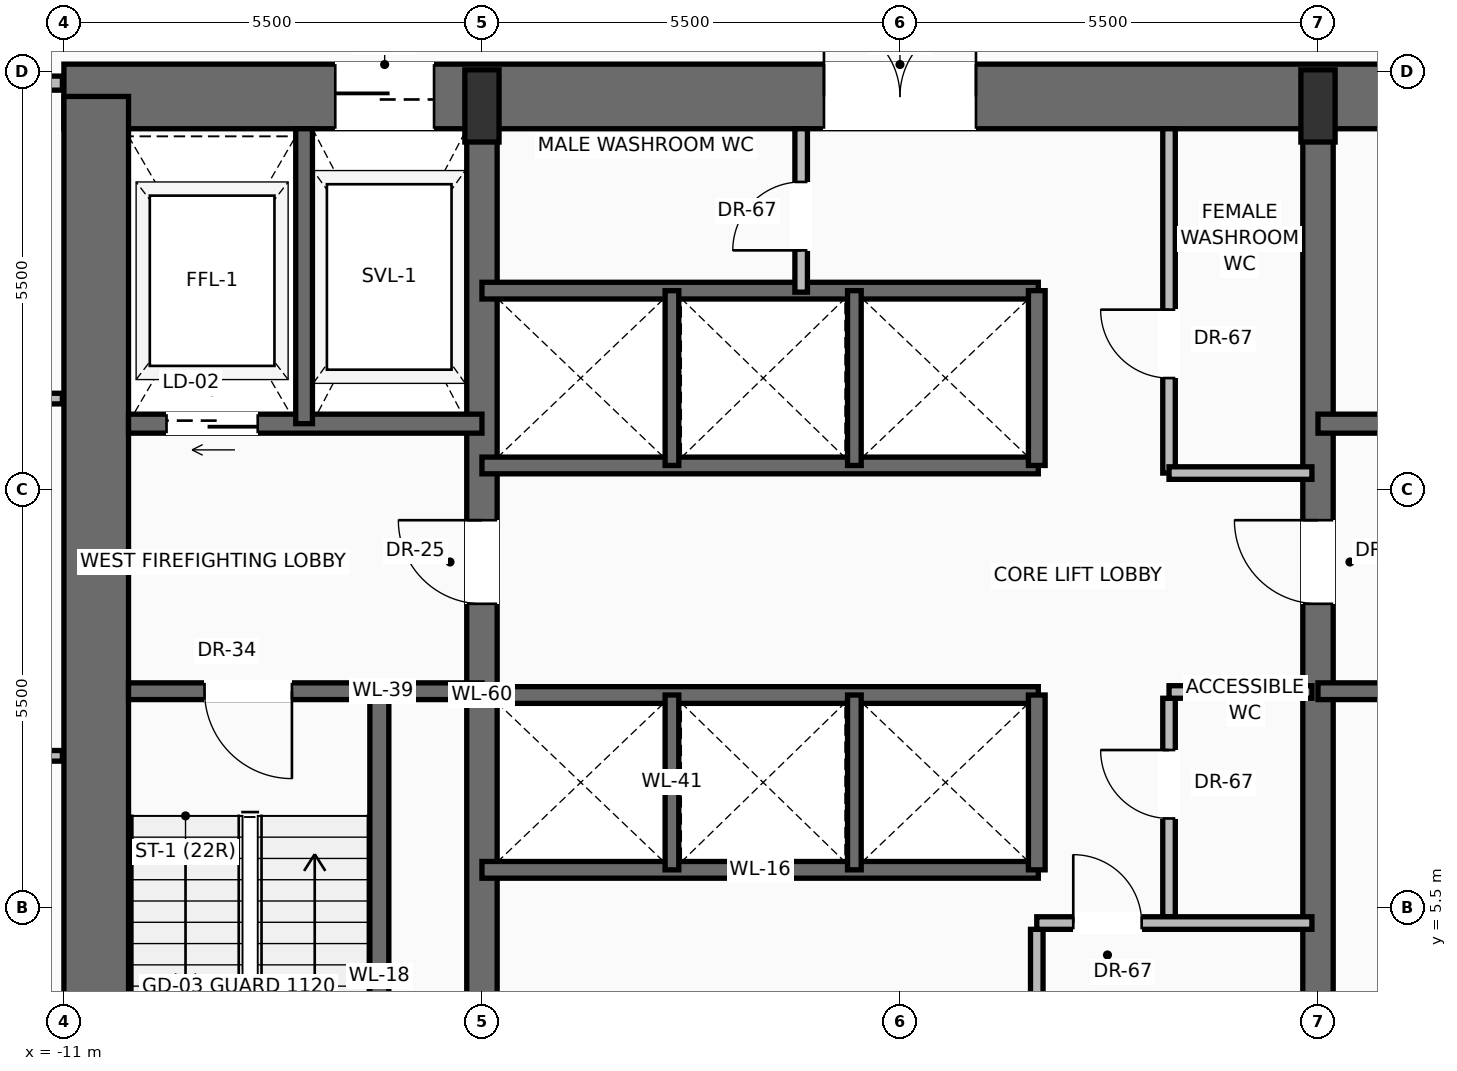
"""IFC4 building model, lengths in metres.
Left out: names, types, materials, properties, quantities, classifications, styles, units other than length and angle.
Written with IfcOpenShell. Run it as: python <this file> out.ifc"""

import sys

from ifc_helpers import new_model, si_unit, direction, frame, frame_2d, origin, origin_2d, place, context, subcontext, project, spatial, rectangle, extrude, source, transform, mapped, element, fill, save


model = new_model("IFC4")
c1 = context("Model", 3, precision=1e-05, world=origin(), true_north=direction((0.0, 1.0)))
c2 = subcontext(c1, "Body", "Model", "MODEL_VIEW")
j1 = project(units=[si_unit("LENGTHUNIT", "METRE"), si_unit("PLANEANGLEUNIT", "RADIAN")], contexts=[c1])
p1 = place(None, origin())
s1 = spatial("IfcSite", under=j1, at=p1, CompositionType="ELEMENT")
p2 = place(p1, origin())
s2 = spatial("IfcBuilding", under=s1, at=p2, CompositionType="ELEMENT")
p3 = place(p2, frame((0.0, 0.0, 38.6)))
s3 = spatial("IfcBuildingStorey", under=s2, at=p3, CompositionType="ELEMENT", Elevation=38.6)
p4 = place(p3, frame((-11.0, 16.175, 0.0), z_axis=(0.0, 0.0, 1.0), x_axis=(1.0, 0.0, 0.0)))
e1 = element("IfcWall", 1, at=p4, inside=s3, PredefinedType="SHEAR", context=c2, shape_type="SweptSolid", body=[
    extrude(rectangle(XDim=22.0, YDim=0.85, at=frame_2d((11.0, 0.0))), origin(), (0.0, 0.0, 1.0), 3.45),
])
p5 = place(p4, frame((3.57, 0.0, 0.0)))
e2 = element("IfcOpeningElement", 2, at=p5, cuts=e1, PredefinedType="OPENING", context=c2, shape_type="SweptSolid", body=[
    extrude(rectangle(XDim=1.3, YDim=2.3, at=frame_2d((0.65, 1.15))), frame((0.0, 0.435, 0.0), z_axis=(0.0, -1.0, 0.0), x_axis=(1.0, 0.0, 0.0)), (0.0, 0.0, 1.0), 0.87),
])
p6 = place(p4, frame((10.0, 0.0, 0.0)))
e3 = element("IfcOpeningElement", 3, at=p6, cuts=e1, PredefinedType="OPENING", context=c2, shape_type="SweptSolid", body=[
    extrude(rectangle(XDim=2.0, YDim=2.4, at=frame_2d((1.0, 1.2))), frame((0.0, 0.435, 0.0), z_axis=(0.0, -1.0, 0.0), x_axis=(1.0, 0.0, 0.0)), (0.0, 0.0, 1.0), 0.87),
])
p7 = place(p3, frame((-10.575, 0.425, 0.0), z_axis=(0.0, 0.0, 1.0), x_axis=(0.0, 1.0, 0.0)))
e4 = element("IfcWall", 4, at=p7, inside=s3, PredefinedType="SHEAR", context=c2, shape_type="SweptSolid", body=[
    extrude(rectangle(XDim=15.75, YDim=0.85, at=frame_2d((7.875, 0.0))), origin(), (0.0, 0.0, 1.0), 3.45),
])
p8 = place(p3, frame((-5.5, 0.425, 0.0), z_axis=(0.0, 0.0, 1.0), x_axis=(0.0, 1.0, 0.0)))
e5 = element("IfcWall", 5, at=p8, inside=s3, PredefinedType="SHEAR", context=c2, shape_type="SweptSolid", body=[
    extrude(rectangle(XDim=15.75, YDim=0.4, at=frame_2d((7.875, 0.0))), origin(), (0.0, 0.0, 1.0), 3.45),
])
p9 = place(p8, frame((9.075, 0.0, 0.0)))
e6 = element("IfcOpeningElement", 6, at=p9, cuts=e5, PredefinedType="OPENING", context=c2, shape_type="SweptSolid", body=[
    extrude(rectangle(XDim=1.1, YDim=2.2, at=frame_2d((0.55, 1.1))), frame((0.0, 0.21, 0.0), z_axis=(0.0, -1.0, 0.0), x_axis=(1.0, 0.0, 0.0)), (0.0, 0.0, 1.0), 0.42),
])
p10 = place(p3, frame((5.5, 0.425, 0.0), z_axis=(0.0, 0.0, 1.0), x_axis=(0.0, 1.0, 0.0)))
e7 = element("IfcWall", 7, at=p10, inside=s3, PredefinedType="SHEAR", context=c2, shape_type="SweptSolid", body=[
    extrude(rectangle(XDim=15.75, YDim=0.4, at=frame_2d((7.875, 0.0))), origin(), (0.0, 0.0, 1.0), 3.45),
])
p11 = place(p10, frame((9.075, 0.0, 0.0)))
e8 = element("IfcOpeningElement", 8, at=p11, cuts=e7, PredefinedType="OPENING", context=c2, shape_type="SweptSolid", body=[
    extrude(rectangle(XDim=1.1, YDim=2.2, at=frame_2d((0.55, 1.1))), frame((0.0, 0.21, 0.0), z_axis=(0.0, -1.0, 0.0), x_axis=(1.0, 0.0, 0.0)), (0.0, 0.0, 1.0), 0.42),
])
m1 = source(origin(), c2, "Body", "SweptSolid", [
    extrude(rectangle(XDim=0.45, YDim=0.95, at=origin_2d()), origin(), (0.0, 0.0, 1.0), 3.7),
])
for number, where, z_axis, x_axis in (
    (9, (-5.5, 16.05, 0.0), (0.0, 0.0, 1.0), (1.0, 0.0, 0.0)),
    (10, (5.5, 16.05, 0.0), (0.0, 0.0, 1.0), (1.0, 0.0, 0.0)),
):
    element("IfcColumn", number, at=place(p3, frame(where, z_axis=z_axis, x_axis=x_axis)), inside=s3, PredefinedType="PILASTER", context=c2, shape_type="MappedRepresentation", body=[
        mapped(m1, transform((0.0, 0.0, 0.0), scale=1.0)),
    ])
p12 = place(p3, frame((-6.85, 0.85, 0.0), z_axis=(0.0, 0.0, 1.0), x_axis=(0.0, 1.0, 0.0)))
e11 = element("IfcWall", 11, at=p12, inside=s3, PredefinedType="SOLIDWALL", context=c2, shape_type="SweptSolid", body=[
    extrude(rectangle(XDim=7.5, YDim=0.25, at=frame_2d((3.75, 0.0))), origin(), (0.0, 0.0, 1.0), 3.45),
])
p13 = place(p3, frame((-5.5, 8.35, 0.0), z_axis=(0.0, 0.0, 1.0), x_axis=(-1.0, 0.0, 0.0)))
e12 = element("IfcWall", 12, at=p13, inside=s3, PredefinedType="SOLIDWALL", context=c2, shape_type="SweptSolid", body=[
    extrude(rectangle(XDim=4.65, YDim=0.22, at=frame_2d((2.325, 0.0))), origin(), (0.0, 0.0, 1.0), 3.45),
])
p14 = place(p13, frame((2.5, 0.0, 0.0)))
e13 = element("IfcOpeningElement", 13, at=p14, cuts=e12, PredefinedType="OPENING", context=c2, shape_type="SweptSolid", body=[
    extrude(rectangle(XDim=1.15, YDim=2.2, at=frame_2d((0.575, 1.1))), frame((0.0, 0.12, 0.0), z_axis=(0.0, -1.0, 0.0), x_axis=(1.0, 0.0, 0.0)), (0.0, 0.0, 1.0), 0.24),
])
p15 = place(p3, frame((-5.5, 11.87, 0.0), z_axis=(0.0, 0.0, 1.0), x_axis=(-1.0, 0.0, 0.0)))
e14 = element("IfcWall", 14, at=p15, inside=s3, PredefinedType="SOLIDWALL", context=c2, shape_type="SweptSolid", body=[
    extrude(rectangle(XDim=4.65, YDim=0.25, at=frame_2d((2.325, 0.0))), origin(), (0.0, 0.0, 1.0), 3.45),
])
p16 = place(p15, frame((2.95, 0.0, 0.0)))
e15 = element("IfcOpeningElement", 15, at=p16, cuts=e14, PredefinedType="OPENING", context=c2, shape_type="SweptSolid", body=[
    extrude(rectangle(XDim=1.2, YDim=2.25, at=frame_2d((0.6, 1.125))), frame((0.0, 0.135, 0.0), z_axis=(0.0, -1.0, 0.0), x_axis=(1.0, 0.0, 0.0)), (0.0, 0.0, 1.0), 0.27),
])
p17 = place(p3, frame((-7.84, 11.87, 0.0), z_axis=(0.0, 0.0, 1.0), x_axis=(0.0, 1.0, 0.0)))
e16 = element("IfcWall", 16, at=p17, inside=s3, PredefinedType="SOLIDWALL", context=c2, shape_type="SweptSolid", body=[
    extrude(rectangle(XDim=3.88, YDim=0.22, at=frame_2d((1.94, 0.0))), origin(), (0.0, 0.0, 1.0), 3.45),
])
p18 = place(p3, frame((10.15, 8.35, 0.0), z_axis=(0.0, 0.0, 1.0), x_axis=(-1.0, 0.0, 0.0)))
e17 = element("IfcWall", 17, at=p18, inside=s3, PredefinedType="SOLIDWALL", context=c2, shape_type="SweptSolid", body=[
    extrude(rectangle(XDim=4.65, YDim=0.22, at=frame_2d((2.325, 0.0))), origin(), (0.0, 0.0, 1.0), 3.45),
])
p19 = place(p18, frame((1.0, 0.0, 0.0)))
e18 = element("IfcOpeningElement", 18, at=p19, cuts=e17, PredefinedType="OPENING", context=c2, shape_type="SweptSolid", body=[
    extrude(rectangle(XDim=1.15, YDim=2.2, at=frame_2d((0.575, 1.1))), frame((0.0, 0.12, 0.0), z_axis=(0.0, -1.0, 0.0), x_axis=(1.0, 0.0, 0.0)), (0.0, 0.0, 1.0), 0.24),
])
p20 = place(p3, frame((10.15, 11.87, 0.0), z_axis=(0.0, 0.0, 1.0), x_axis=(-1.0, 0.0, 0.0)))
e19 = element("IfcWall", 19, at=p20, inside=s3, PredefinedType="SOLIDWALL", context=c2, shape_type="SweptSolid", body=[
    extrude(rectangle(XDim=4.65, YDim=0.25, at=frame_2d((2.325, 0.0))), origin(), (0.0, 0.0, 1.0), 3.45),
])
p21 = place(p20, frame((0.5, 0.0, 0.0)))
e20 = element("IfcOpeningElement", 20, at=p21, cuts=e19, PredefinedType="OPENING", context=c2, shape_type="SweptSolid", body=[
    extrude(rectangle(XDim=1.2, YDim=2.25, at=frame_2d((0.6, 1.125))), frame((0.0, 0.135, 0.0), z_axis=(0.0, -1.0, 0.0), x_axis=(1.0, 0.0, 0.0)), (0.0, 0.0, 1.0), 0.27),
])
p22 = place(p3, frame((1.8, 3.16, 0.0), z_axis=(0.0, 0.0, 1.0), x_axis=(0.0, 1.0, 0.0)))
e21 = element("IfcWall", 21, at=p22, inside=s3, PredefinedType="PARTITIONING", context=c2, shape_type="SweptSolid", body=[
    extrude(rectangle(XDim=2.058, YDim=0.165, at=frame_2d((1.029, 0.0))), origin(), (0.0, 0.0, 1.0), 3.442),
])
p23 = place(p3, frame((3.54, 5.383, 0.0), z_axis=(0.0, 0.0, 1.0), x_axis=(0.0, 1.0, 0.0)))
e22 = element("IfcWall", 22, at=p23, inside=s3, PredefinedType="PARTITIONING", context=c2, shape_type="SweptSolid", body=[
    extrude(rectangle(XDim=2.875, YDim=0.165, at=frame_2d((1.438, 0.0))), origin(), (0.0, 0.0, 1.0), 3.442),
])
p24 = place(p23, frame((1.294, 0.0, 0.0)))
e23 = element("IfcOpeningElement", 23, at=p24, cuts=e22, PredefinedType="OPENING", context=c2, shape_type="SweptSolid", body=[
    extrude(rectangle(XDim=0.9, YDim=2.1, at=frame_2d((0.45, 1.05))), frame((0.0, 0.093, 0.0), z_axis=(0.0, -1.0, 0.0), x_axis=(1.0, 0.0, 0.0)), (0.0, 0.0, 1.0), 0.185),
])
p25 = place(p3, frame((3.54, 8.34, 0.0), z_axis=(0.0, 0.0, 1.0), x_axis=(1.0, 0.0, 0.0)))
e24 = element("IfcWall", 24, at=p25, inside=s3, PredefinedType="PARTITIONING", context=c2, shape_type="SweptSolid", body=[
    extrude(rectangle(XDim=1.88, YDim=0.165, at=frame_2d((0.94, 0.0))), origin(), (0.0, 0.0, 1.0), 3.442),
])
p26 = place(p3, frame((1.8, 5.3, 0.0), z_axis=(0.0, 0.0, 1.0), x_axis=(1.0, 0.0, 0.0)))
e25 = element("IfcWall", 25, at=p26, inside=s3, PredefinedType="PARTITIONING", context=c2, shape_type="SweptSolid", body=[
    extrude(rectangle(XDim=3.62, YDim=0.165, at=frame_2d((1.81, 0.0))), origin(), (0.0, 0.0, 1.0), 3.442),
])
p27 = place(p26, frame((0.48, 0.0, 0.0)))
e26 = element("IfcOpeningElement", 26, at=p27, cuts=e25, PredefinedType="OPENING", context=c2, shape_type="SweptSolid", body=[
    extrude(rectangle(XDim=0.9, YDim=2.1, at=frame_2d((0.45, 1.05))), frame((0.0, 0.093, 0.0), z_axis=(0.0, -1.0, 0.0), x_axis=(1.0, 0.0, 0.0)), (0.0, 0.0, 1.0), 0.185),
])
for number, where, z_axis, x_axis in (
    (27, (-5.5, 6.0, 0.0), (0.0, 0.0, 1.0), (1.0, 0.0, 0.0)),
    (28, (-5.5, 8.3, 0.0), (0.0, 0.0, 1.0), (1.0, 0.0, 0.0)),
):
    element("IfcWall", number, at=place(p3, frame(where, z_axis=z_axis, x_axis=x_axis)), inside=s3, PredefinedType="SOLIDWALL", context=c2, shape_type="SweptSolid", body=[
        extrude(rectangle(XDim=7.32, YDim=0.22, at=frame_2d((3.66, 0.0))), origin(), (0.0, 0.0, 1.0), 3.45),
    ])
p28 = place(p3, frame((1.8, 6.0, 0.0), z_axis=(0.0, 0.0, 1.0), x_axis=(0.0, 1.0, 0.0)))
e29 = element("IfcWall", 29, at=p28, inside=s3, PredefinedType="SOLIDWALL", context=c2, shape_type="SweptSolid", body=[
    extrude(rectangle(XDim=2.3, YDim=0.22, at=frame_2d((1.15, 0.0))), origin(), (0.0, 0.0, 1.0), 3.45),
])
for number, where, z_axis, x_axis in (
    (30, (-3.0, 6.0, 0.0), (0.0, 0.0, 1.0), (0.0, 1.0, 0.0)),
    (31, (-0.6, 6.0, 0.0), (0.0, 0.0, 1.0), (0.0, 1.0, 0.0)),
):
    element("IfcWall", number, at=place(p3, frame(where, z_axis=z_axis, x_axis=x_axis)), inside=s3, PredefinedType="SOLIDWALL", context=c2, shape_type="SweptSolid", body=[
        extrude(rectangle(XDim=2.3, YDim=0.18, at=frame_2d((1.15, 0.0))), origin(), (0.0, 0.0, 1.0), 3.45),
    ])
for number, where, z_axis, x_axis in (
    (32, (-5.5, 11.32, 0.0), (0.0, 0.0, 1.0), (1.0, 0.0, 0.0)),
    (33, (-5.5, 13.62, 0.0), (0.0, 0.0, 1.0), (1.0, 0.0, 0.0)),
):
    element("IfcWall", number, at=place(p3, frame(where, z_axis=z_axis, x_axis=x_axis)), inside=s3, PredefinedType="SOLIDWALL", context=c2, shape_type="SweptSolid", body=[
        extrude(rectangle(XDim=7.32, YDim=0.22, at=frame_2d((3.66, 0.0))), origin(), (0.0, 0.0, 1.0), 3.45),
    ])
p29 = place(p3, frame((1.8, 11.32, 0.0), z_axis=(0.0, 0.0, 1.0), x_axis=(0.0, 1.0, 0.0)))
e34 = element("IfcWall", 34, at=p29, inside=s3, PredefinedType="SOLIDWALL", context=c2, shape_type="SweptSolid", body=[
    extrude(rectangle(XDim=2.3, YDim=0.22, at=frame_2d((1.15, 0.0))), origin(), (0.0, 0.0, 1.0), 3.45),
])
for number, where, z_axis, x_axis in (
    (35, (-3.0, 11.32, 0.0), (0.0, 0.0, 1.0), (0.0, 1.0, 0.0)),
    (36, (-0.6, 11.32, 0.0), (0.0, 0.0, 1.0), (0.0, 1.0, 0.0)),
):
    element("IfcWall", number, at=place(p3, frame(where, z_axis=z_axis, x_axis=x_axis)), inside=s3, PredefinedType="SOLIDWALL", context=c2, shape_type="SweptSolid", body=[
        extrude(rectangle(XDim=2.3, YDim=0.18, at=frame_2d((1.15, 0.0))), origin(), (0.0, 0.0, 1.0), 3.45),
    ])
p30 = place(p3, frame((-1.3, 13.6, 0.0), z_axis=(0.0, 0.0, 1.0), x_axis=(0.0, 1.0, 0.0)))
e37 = element("IfcWall", 37, at=p30, inside=s3, PredefinedType="PARTITIONING", context=c2, shape_type="SweptSolid", body=[
    extrude(rectangle(XDim=2.15, YDim=0.165, at=frame_2d((1.075, 0.0))), origin(), (0.0, 0.0, 1.0), 3.442),
])
p31 = place(p30, frame((0.55, 0.0, 0.0)))
e38 = element("IfcOpeningElement", 38, at=p31, cuts=e37, PredefinedType="OPENING", context=c2, shape_type="SweptSolid", body=[
    extrude(rectangle(XDim=0.9, YDim=2.1, at=frame_2d((0.45, 1.05))), frame((0.0, 0.093, 0.0), z_axis=(0.0, -1.0, 0.0), x_axis=(1.0, 0.0, 0.0)), (0.0, 0.0, 1.0), 0.185),
])
p32 = place(p3, frame((3.54, 11.22, 0.0), z_axis=(0.0, 0.0, 1.0), x_axis=(0.0, 1.0, 0.0)))
e39 = element("IfcWall", 39, at=p32, inside=s3, PredefinedType="PARTITIONING", context=c2, shape_type="SweptSolid", body=[
    extrude(rectangle(XDim=4.53, YDim=0.165, at=frame_2d((2.265, 0.0))), origin(), (0.0, 0.0, 1.0), 3.442),
])
p33 = place(p32, frame((1.25, 0.0, 0.0)))
e40 = element("IfcOpeningElement", 40, at=p33, cuts=e39, PredefinedType="OPENING", context=c2, shape_type="SweptSolid", body=[
    extrude(rectangle(XDim=0.9, YDim=2.1, at=frame_2d((0.45, 1.05))), frame((0.0, 0.093, 0.0), z_axis=(0.0, -1.0, 0.0), x_axis=(1.0, 0.0, 0.0)), (0.0, 0.0, 1.0), 0.185),
])
p34 = place(p3, frame((3.54, 11.22, 0.0), z_axis=(0.0, 0.0, 1.0), x_axis=(1.0, 0.0, 0.0)))
e41 = element("IfcWall", 41, at=p34, inside=s3, PredefinedType="PARTITIONING", context=c2, shape_type="SweptSolid", body=[
    extrude(rectangle(XDim=1.88, YDim=0.165, at=frame_2d((0.94, 0.0))), origin(), (0.0, 0.0, 1.0), 3.442),
])
p35 = place(p3, frame((-24.93, 16.35, 0.0), z_axis=(0.0, 0.0, 1.0), x_axis=(1.0, 0.0, 0.0)))
e42 = element("IfcWall", 42, at=p35, inside=s3, PredefinedType="PARTITIONING", context=c2, shape_type="SweptSolid", body=[
    extrude(rectangle(XDim=13.91, YDim=0.185, at=frame_2d((6.955, 0.0))), origin(), (0.0, 0.0, 1.0), 2.747),
])
p36 = place(p35, frame((5.819, 0.0, 0.0)))
e43 = element("IfcOpeningElement", 43, at=p36, cuts=e42, PredefinedType="OPENING", context=c2, shape_type="SweptSolid", body=[
    extrude(rectangle(XDim=0.95, YDim=2.2, at=frame_2d((0.475, 1.1))), frame((0.0, 0.103, 0.0), z_axis=(0.0, -1.0, 0.0), x_axis=(1.0, 0.0, 0.0)), (0.0, 0.0, 1.0), 0.205),
])
p37 = place(p3, frame((-26.414, 7.5, 0.0), z_axis=(0.0, 0.0, 1.0), x_axis=(1.0, 0.0, 0.0)))
e44 = element("IfcWall", 44, at=p37, inside=s3, PredefinedType="PARTITIONING", context=c2, shape_type="SweptSolid", body=[
    extrude(rectangle(XDim=15.394, YDim=0.14, at=frame_2d((7.697, 0.0))), origin(), (0.0, 0.0, 1.0), 2.979),
])
p38 = place(p37, frame((7.234, 0.0, 0.0)))
e45 = element("IfcOpeningElement", 45, at=p38, cuts=e44, PredefinedType="OPENING", context=c2, shape_type="SweptSolid", body=[
    extrude(rectangle(XDim=0.95, YDim=2.2, at=frame_2d((0.475, 1.1))), frame((0.0, 0.08, 0.0), z_axis=(0.0, -1.0, 0.0), x_axis=(1.0, 0.0, 0.0)), (0.0, 0.0, 1.0), 0.16),
])
p39 = place(p3, frame((-27.76, 12.2, 0.0), z_axis=(0.0, 0.0, 1.0), x_axis=(1.0, 0.0, 0.0)))
e46 = element("IfcWall", 46, at=p39, inside=s3, PredefinedType="PARTITIONING", context=c2, shape_type="SweptSolid", body=[
    extrude(rectangle(XDim=16.74, YDim=0.14, at=frame_2d((8.37, 0.0))), origin(), (0.0, 0.0, 1.0), 3.442),
])
p40 = place(p39, frame((7.908, 0.0, 0.0)))
e47 = element("IfcOpeningElement", 47, at=p40, cuts=e46, PredefinedType="OPENING", context=c2, shape_type="SweptSolid", body=[
    extrude(rectangle(XDim=0.95, YDim=2.2, at=frame_2d((0.475, 1.1))), frame((0.0, 0.08, 0.0), z_axis=(0.0, -1.0, 0.0), x_axis=(1.0, 0.0, 0.0)), (0.0, 0.0, 1.0), 0.16),
])
m2 = source(origin(), c2, "Body", "SweptSolid", [
    extrude(rectangle(XDim=1.15, YDim=2.2, at=frame_2d((0.575, 1.1))), frame((0.0, 0.025, 0.0), z_axis=(0.0, -1.0, 0.0), x_axis=(1.0, 0.0, 0.0)), (0.0, 0.0, 1.0), 0.05),
])
p41 = place(p14, origin())
e48 = element("IfcDoor", 48, at=p41, inside=s3, OperationType="SINGLE_SWING_LEFT", PredefinedType="DOOR", context=c2, shape_type="MappedRepresentation", body=[
    mapped(m2, transform((0.0, 0.0, 0.0), scale=1.0)),
])
fill(e13, e48)
m3 = source(origin(), c2, "Body", "SweptSolid", [
    extrude(rectangle(XDim=1.1, YDim=2.2, at=frame_2d((0.55, 1.1))), frame((0.0, 0.025, 0.0), z_axis=(0.0, -1.0, 0.0), x_axis=(1.0, 0.0, 0.0)), (0.0, 0.0, 1.0), 0.05),
])
p42 = place(p9, origin())
e49 = element("IfcDoor", 49, at=p42, inside=s3, OperationType="SINGLE_SWING_RIGHT", PredefinedType="DOOR", context=c2, shape_type="MappedRepresentation", body=[
    mapped(m3, transform((0.0, 0.0, 0.0), scale=1.0)),
])
fill(e6, e49)
m4 = source(origin(), c2, "Body", "SweptSolid", [
    extrude(rectangle(XDim=1.2, YDim=2.25, at=frame_2d((0.6, 1.125))), frame((0.0, 0.025, 0.0), z_axis=(0.0, -1.0, 0.0), x_axis=(1.0, 0.0, 0.0)), (0.0, 0.0, 1.0), 0.05),
])
p43 = place(p16, origin())
e50 = element("IfcDoor", 50, at=p43, inside=s3, OperationType="SLIDING_TO_LEFT", PredefinedType="DOOR", context=c2, shape_type="MappedRepresentation", body=[
    mapped(m4, transform((0.0, 0.0, 0.0), scale=1.0)),
])
fill(e15, e50)
m5 = source(origin(), c2, "Body", "SweptSolid", [
    extrude(rectangle(XDim=1.3, YDim=2.3, at=frame_2d((0.65, 1.15))), frame((0.0, 0.025, 0.0), z_axis=(0.0, -1.0, 0.0), x_axis=(1.0, 0.0, 0.0)), (0.0, 0.0, 1.0), 0.05),
])
p44 = place(p5, origin())
e51 = element("IfcDoor", 51, at=p44, inside=s3, OperationType="SLIDING_TO_RIGHT", PredefinedType="DOOR", context=c2, shape_type="MappedRepresentation", body=[
    mapped(m5, transform((0.0, 0.0, 0.0), scale=1.0)),
])
fill(e2, e51)
p45 = place(p11, origin())
e52 = element("IfcDoor", 52, at=p45, inside=s3, OperationType="SINGLE_SWING_RIGHT", PredefinedType="DOOR", context=c2, shape_type="MappedRepresentation", body=[
    mapped(m3, transform((0.0, 0.0, 0.0), scale=1.0)),
])
fill(e8, e52)
m6 = source(origin(), c2, "Body", "SweptSolid", [
    extrude(rectangle(XDim=2.0, YDim=2.4, at=frame_2d((1.0, 1.2))), frame((0.0, 0.025, 0.0), z_axis=(0.0, -1.0, 0.0), x_axis=(1.0, 0.0, 0.0)), (0.0, 0.0, 1.0), 0.05),
])
p46 = place(p6, origin())
e53 = element("IfcDoor", 53, at=p46, inside=s3, OperationType="DOUBLE_DOOR_SINGLE_SWING", PredefinedType="DOOR", context=c2, shape_type="MappedRepresentation", body=[
    mapped(m6, transform((0.0, 0.0, 0.0), scale=1.0)),
])
fill(e3, e53)
m7 = source(origin(), c2, "Body", "SweptSolid", [
    extrude(rectangle(XDim=0.9, YDim=2.1, at=frame_2d((0.45, 1.05))), frame((0.0, 0.025, 0.0), z_axis=(0.0, -1.0, 0.0), x_axis=(1.0, 0.0, 0.0)), (0.0, 0.0, 1.0), 0.05),
])
p47 = place(p27, origin())
e54 = element("IfcDoor", 54, at=p47, inside=s3, OperationType="SINGLE_SWING_LEFT", PredefinedType="DOOR", context=c2, shape_type="MappedRepresentation", body=[
    mapped(m7, transform((0.0, 0.0, 0.0), scale=1.0)),
])
fill(e26, e54)
p48 = place(p24, origin())
e55 = element("IfcDoor", 55, at=p48, inside=s3, OperationType="SINGLE_SWING_RIGHT", PredefinedType="DOOR", context=c2, shape_type="MappedRepresentation", body=[
    mapped(m7, transform((0.0, 0.0, 0.0), scale=1.0)),
])
fill(e23, e55)
p49 = place(p31, origin())
e56 = element("IfcDoor", 56, at=p49, inside=s3, OperationType="SINGLE_SWING_LEFT", PredefinedType="DOOR", context=c2, shape_type="MappedRepresentation", body=[
    mapped(m7, transform((0.0, 0.0, 0.0), scale=1.0)),
])
fill(e38, e56)
p50 = place(p33, origin())
e57 = element("IfcDoor", 57, at=p50, inside=s3, OperationType="SINGLE_SWING_RIGHT", PredefinedType="DOOR", context=c2, shape_type="MappedRepresentation", body=[
    mapped(m7, transform((0.0, 0.0, 0.0), scale=1.0)),
])
fill(e40, e57)
save(model, sys.argv[1])
